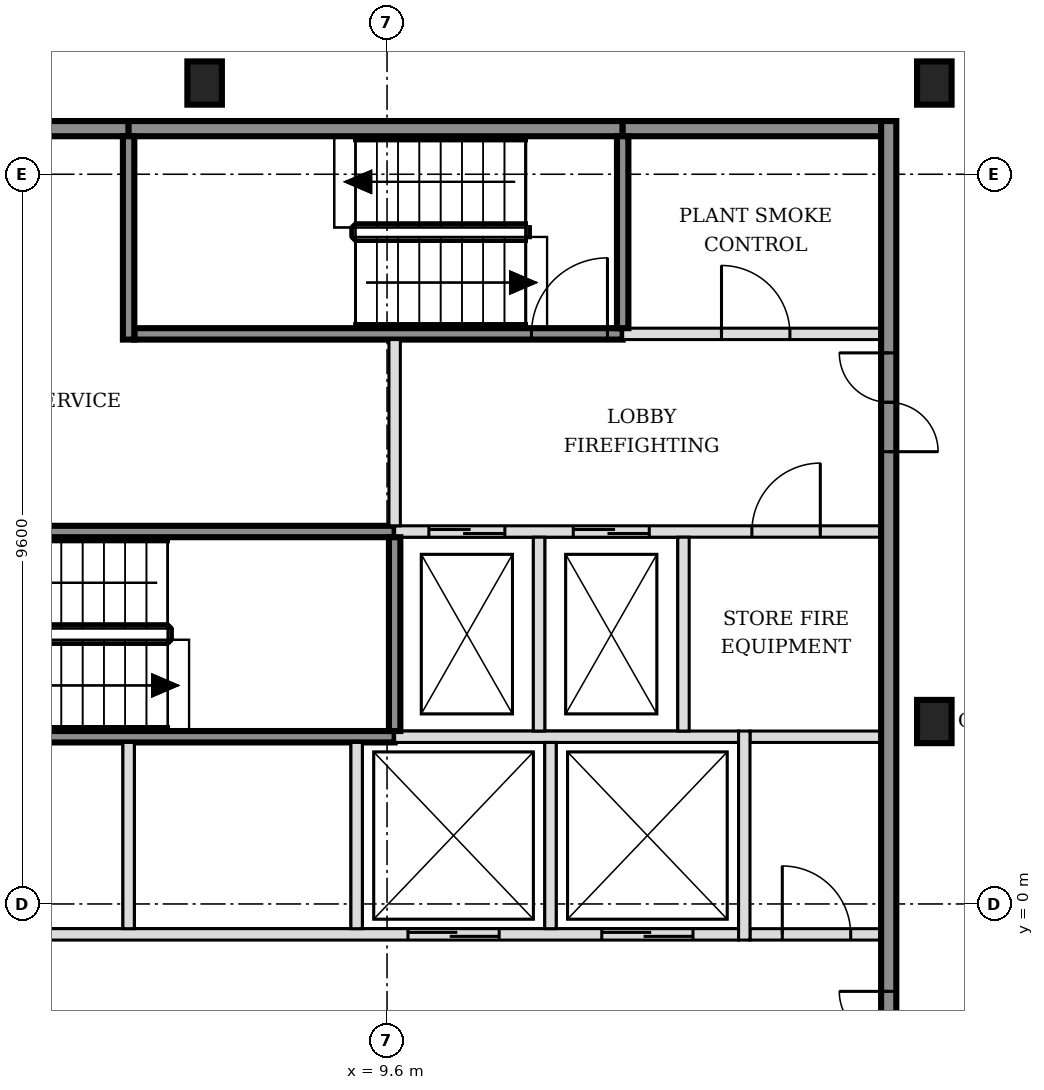
"""IFC4 building model, lengths in metres.
Left out: names, types, materials, properties, quantities, classifications, styles, units other than length and angle.
Written with IfcOpenShell. Run it as: python <this file> out.ifc"""

import sys

from ifc_helpers import new_model, si_unit, direction, frame, frame_2d, origin, origin_2d, place, context, subcontext, project, spatial, rectangle, i_section, extrude, element, fill, save


model = new_model("IFC4")
c1 = context("Model", 3, precision=1e-05, world=origin(), true_north=direction((0.0, 1.0)))
c2 = subcontext(c1, "Body", "Model", "MODEL_VIEW")
j1 = project(units=[si_unit("LENGTHUNIT", "METRE"), si_unit("PLANEANGLEUNIT", "RADIAN")], contexts=[c1])
p1 = place(None, origin())
s1 = spatial("IfcSite", under=j1, at=p1, CompositionType="ELEMENT")
p2 = place(p1, origin())
s2 = spatial("IfcBuilding", under=s1, at=p2, CompositionType="ELEMENT")
p3 = place(p2, frame((0.0, 0.0, 15.0)))
s3 = spatial("IfcBuildingStorey", under=s2, at=p3, CompositionType="ELEMENT", Elevation=15.0)
for number, where, z_axis, x_axis in (
    (1, (16.8, 2.4, -0.2), (0.0, 0.0, 1.0), (1.0, 0.0, 0.0)),
    (2, (7.2, 10.8, -0.2), (0.0, 0.0, 1.0), (1.0, 0.0, 0.0)),
    (3, (16.8, 10.8, -0.2), (0.0, 0.0, 1.0), (1.0, 0.0, 0.0)),
):
    element("IfcColumn", number, at=place(p3, frame(where, z_axis=z_axis, x_axis=x_axis)), inside=s3, PredefinedType="COLUMN", context=c2, shape_type="SweptSolid", body=[
        extrude(i_section(OverallWidth=0.454, OverallDepth=0.569, WebThickness=0.078, FlangeThickness=0.125, FilletRadius=0.015, at=origin_2d()), origin(), (0.0, 0.0, 1.0), 6.0),
    ])
p4 = place(p3, frame((-1.7, -0.4, 0.0), z_axis=(0.0, 0.0, 1.0), x_axis=(1.0, 0.0, 0.0)))
e4 = element("IfcWall", 4, at=p4, inside=s3, PredefinedType="SOLIDWALL", context=c2, shape_type="SweptSolid", body=[
    extrude(rectangle(XDim=15.925, YDim=0.15, at=frame_2d((7.962, 0.0))), origin(), (0.0, 0.0, 1.0), 5.8),
])
p5 = place(p4, frame((0.6, 0.0, 0.0)))
e5 = element("IfcOpeningElement", 5, at=p5, cuts=e4, PredefinedType="OPENING", context=c2, shape_type="SweptSolid", body=[
    extrude(rectangle(XDim=1.1, YDim=2.1, at=frame_2d((0.55, 1.05))), frame((0.0, 0.085, 0.0), z_axis=(0.0, -1.0, 0.0), x_axis=(1.0, 0.0, 0.0)), (0.0, 0.0, 1.0), 0.17),
])
p6 = place(p4, frame((3.1, 0.0, 0.0)))
e6 = element("IfcOpeningElement", 6, at=p6, cuts=e4, PredefinedType="OPENING", context=c2, shape_type="SweptSolid", body=[
    extrude(rectangle(XDim=1.1, YDim=2.1, at=frame_2d((0.55, 1.05))), frame((0.0, 0.085, 0.0), z_axis=(0.0, -1.0, 0.0), x_axis=(1.0, 0.0, 0.0)), (0.0, 0.0, 1.0), 0.17),
])
p7 = place(p4, frame((11.575, 0.0, 0.0)))
e7 = element("IfcOpeningElement", 7, at=p7, cuts=e4, PredefinedType="OPENING", context=c2, shape_type="SweptSolid", body=[
    extrude(rectangle(XDim=1.2, YDim=2.1, at=frame_2d((0.6, 1.05))), frame((0.0, 0.085, 0.0), z_axis=(0.0, -1.0, 0.0), x_axis=(1.0, 0.0, 0.0)), (0.0, 0.0, 1.0), 0.17),
])
p8 = place(p4, frame((14.125, 0.0, 0.0)))
e8 = element("IfcOpeningElement", 8, at=p8, cuts=e4, PredefinedType="OPENING", context=c2, shape_type="SweptSolid", body=[
    extrude(rectangle(XDim=1.2, YDim=2.1, at=frame_2d((0.6, 1.05))), frame((0.0, 0.085, 0.0), z_axis=(0.0, -1.0, 0.0), x_axis=(1.0, 0.0, 0.0)), (0.0, 0.0, 1.0), 0.17),
])
p9 = place(p3, frame((14.375, -0.4, 0.0), z_axis=(0.0, 0.0, 1.0), x_axis=(1.0, 0.0, 0.0)))
e9 = element("IfcWall", 9, at=p9, inside=s3, PredefinedType="PARTITIONING", context=c2, shape_type="SweptSolid", body=[
    extrude(rectangle(XDim=1.725, YDim=0.15, at=frame_2d((0.863, 0.0))), origin(), (0.0, 0.0, 1.0), 5.8),
])
p10 = place(p9, frame((0.425, 0.0, 0.0)))
e10 = element("IfcOpeningElement", 10, at=p10, cuts=e9, PredefinedType="OPENING", context=c2, shape_type="SweptSolid", body=[
    extrude(rectangle(XDim=0.9, YDim=2.1, at=frame_2d((0.45, 1.05))), frame((0.0, 0.085, 0.0), z_axis=(0.0, -1.0, 0.0), x_axis=(1.0, 0.0, 0.0)), (0.0, 0.0, 1.0), 0.17),
])
p11 = place(p3, frame((3.2, 2.2, 0.0), z_axis=(0.0, 0.0, 1.0), x_axis=(1.0, 0.0, 0.0)))
e11 = element("IfcWall", 11, at=p11, inside=s3, PredefinedType="SOLIDWALL", context=c2, shape_type="SweptSolid", body=[
    extrude(rectangle(XDim=6.5, YDim=0.15, at=frame_2d((3.25, 0.0))), origin(), (0.0, 0.0, 1.0), 5.8),
])
p12 = place(p3, frame((9.7, 2.2, 0.0), z_axis=(0.0, 0.0, 1.0), x_axis=(1.0, 0.0, 0.0)))
e12 = element("IfcWall", 12, at=p12, inside=s3, PredefinedType="SOLIDWALL", context=c2, shape_type="SweptSolid", body=[
    extrude(rectangle(XDim=4.525, YDim=0.15, at=frame_2d((2.263, 0.0))), origin(), (0.0, 0.0, 1.0), 5.8),
])
p13 = place(p3, frame((14.375, 2.2, 0.0), z_axis=(0.0, 0.0, 1.0), x_axis=(1.0, 0.0, 0.0)))
e13 = element("IfcWall", 13, at=p13, inside=s3, PredefinedType="PARTITIONING", context=c2, shape_type="SweptSolid", body=[
    extrude(rectangle(XDim=1.725, YDim=0.15, at=frame_2d((0.863, 0.0))), origin(), (0.0, 0.0, 1.0), 5.8),
])
p14 = place(p3, frame((3.275, 4.9, 0.0), z_axis=(0.0, 0.0, 1.0), x_axis=(1.0, 0.0, 0.0)))
e14 = element("IfcWall", 14, at=p14, inside=s3, PredefinedType="SOLIDWALL", context=c2, shape_type="SweptSolid", body=[
    extrude(rectangle(XDim=6.425, YDim=0.15, at=frame_2d((3.212, 0.0))), origin(), (0.0, 0.0, 1.0), 5.8),
])
p15 = place(p14, frame((0.1, 0.0, 0.0)))
e15 = element("IfcOpeningElement", 15, at=p15, cuts=e14, PredefinedType="OPENING", context=c2, shape_type="SweptSolid", body=[
    extrude(rectangle(XDim=1.0, YDim=2.1, at=frame_2d((0.5, 1.05))), frame((0.0, 0.085, 0.0), z_axis=(0.0, -1.0, 0.0), x_axis=(1.0, 0.0, 0.0)), (0.0, 0.0, 1.0), 0.17),
])
p16 = place(p3, frame((9.7, 4.9, 0.0), z_axis=(0.0, 0.0, 1.0), x_axis=(1.0, 0.0, 0.0)))
e16 = element("IfcWall", 16, at=p16, inside=s3, PredefinedType="SOLIDWALL", context=c2, shape_type="SweptSolid", body=[
    extrude(rectangle(XDim=6.4, YDim=0.15, at=frame_2d((3.2, 0.0))), origin(), (0.0, 0.0, 1.0), 5.8),
])
p17 = place(p16, frame((0.45, 0.0, 0.0)))
e17 = element("IfcOpeningElement", 17, at=p17, cuts=e16, PredefinedType="OPENING", context=c2, shape_type="SweptSolid", body=[
    extrude(rectangle(XDim=1.0, YDim=2.1, at=frame_2d((0.5, 1.05))), frame((0.0, 0.085, 0.0), z_axis=(0.0, -1.0, 0.0), x_axis=(1.0, 0.0, 0.0)), (0.0, 0.0, 1.0), 0.17),
])
p18 = place(p16, frame((2.35, 0.0, 0.0)))
e18 = element("IfcOpeningElement", 18, at=p18, cuts=e16, PredefinedType="OPENING", context=c2, shape_type="SweptSolid", body=[
    extrude(rectangle(XDim=1.0, YDim=2.1, at=frame_2d((0.5, 1.05))), frame((0.0, 0.085, 0.0), z_axis=(0.0, -1.0, 0.0), x_axis=(1.0, 0.0, 0.0)), (0.0, 0.0, 1.0), 0.17),
])
p19 = place(p16, frame((4.7, 0.0, 0.0)))
e19 = element("IfcOpeningElement", 19, at=p19, cuts=e16, PredefinedType="OPENING", context=c2, shape_type="SweptSolid", body=[
    extrude(rectangle(XDim=0.9, YDim=2.1, at=frame_2d((0.45, 1.05))), frame((0.0, 0.085, 0.0), z_axis=(0.0, -1.0, 0.0), x_axis=(1.0, 0.0, 0.0)), (0.0, 0.0, 1.0), 0.17),
])
p20 = place(p3, frame((6.275, 7.5, 0.0), z_axis=(0.0, 0.0, 1.0), x_axis=(1.0, 0.0, 0.0)))
e20 = element("IfcWall", 20, at=p20, inside=s3, PredefinedType="SOLIDWALL", context=c2, shape_type="SweptSolid", body=[
    extrude(rectangle(XDim=6.425, YDim=0.15, at=frame_2d((3.212, 0.0))), origin(), (0.0, 0.0, 1.0), 5.8),
])
p21 = place(p20, frame((5.225, 0.0, 0.0)))
e21 = element("IfcOpeningElement", 21, at=p21, cuts=e20, PredefinedType="OPENING", context=c2, shape_type="SweptSolid", body=[
    extrude(rectangle(XDim=1.0, YDim=2.1, at=frame_2d((0.5, 1.05))), frame((0.0, 0.085, 0.0), z_axis=(0.0, -1.0, 0.0), x_axis=(1.0, 0.0, 0.0)), (0.0, 0.0, 1.0), 0.17),
])
p22 = place(p3, frame((12.7, 7.5, 0.0), z_axis=(0.0, 0.0, 1.0), x_axis=(1.0, 0.0, 0.0)))
e22 = element("IfcWall", 22, at=p22, inside=s3, PredefinedType="SOLIDWALL", context=c2, shape_type="SweptSolid", body=[
    extrude(rectangle(XDim=3.4, YDim=0.15, at=frame_2d((1.7, 0.0))), origin(), (0.0, 0.0, 1.0), 5.8),
])
p23 = place(p22, frame((1.3, 0.0, 0.0)))
e23 = element("IfcOpeningElement", 23, at=p23, cuts=e22, PredefinedType="OPENING", context=c2, shape_type="SweptSolid", body=[
    extrude(rectangle(XDim=0.9, YDim=2.1, at=frame_2d((0.45, 1.05))), frame((0.0, 0.085, 0.0), z_axis=(0.0, -1.0, 0.0), x_axis=(1.0, 0.0, 0.0)), (0.0, 0.0, 1.0), 0.17),
])
p24 = place(p3, frame((-1.7, 10.2, 0.0), z_axis=(0.0, 0.0, 1.0), x_axis=(1.0, 0.0, 0.0)))
e24 = element("IfcWall", 24, at=p24, inside=s3, PredefinedType="SOLIDWALL", context=c2, shape_type="SweptSolid", body=[
    extrude(rectangle(XDim=7.9, YDim=0.2, at=frame_2d((3.95, 0.0))), origin(), (0.0, 0.0, 1.0), 5.8),
])
p25 = place(p3, frame((6.2, 10.2, 0.0), z_axis=(0.0, 0.0, 1.0), x_axis=(1.0, 0.0, 0.0)))
e25 = element("IfcWall", 25, at=p25, inside=s3, PredefinedType="SOLIDWALL", context=c2, shape_type="SweptSolid", body=[
    extrude(rectangle(XDim=6.5, YDim=0.2, at=frame_2d((3.25, 0.0))), origin(), (0.0, 0.0, 1.0), 5.8),
])
p26 = place(p3, frame((12.7, 10.2, 0.0), z_axis=(0.0, 0.0, 1.0), x_axis=(1.0, 0.0, 0.0)))
e26 = element("IfcWall", 26, at=p26, inside=s3, PredefinedType="SOLIDWALL", context=c2, shape_type="SweptSolid", body=[
    extrude(rectangle(XDim=3.4, YDim=0.2, at=frame_2d((1.7, 0.0))), origin(), (0.0, 0.0, 1.0), 5.8),
])
p27 = place(p3, frame((6.2, -0.325, 0.0), z_axis=(0.0, 0.0, 1.0), x_axis=(0.0, 1.0, 0.0)))
e27 = element("IfcWall", 27, at=p27, inside=s3, PredefinedType="SOLIDWALL", context=c2, shape_type="SweptSolid", body=[
    extrude(rectangle(XDim=2.45, YDim=0.15, at=frame_2d((1.225, 0.0))), origin(), (0.0, 0.0, 1.0), 5.8),
])
p28 = place(p3, frame((6.2, 7.425, 0.0), z_axis=(0.0, 0.0, 1.0), x_axis=(0.0, 1.0, 0.0)))
e28 = element("IfcWall", 28, at=p28, inside=s3, PredefinedType="SOLIDWALL", context=c2, shape_type="SweptSolid", body=[
    extrude(rectangle(XDim=2.675, YDim=0.15, at=frame_2d((1.337, 0.0))), origin(), (0.0, 0.0, 1.0), 5.8),
])
p29 = place(p3, frame((9.2, -0.325, 0.0), z_axis=(0.0, 0.0, 1.0), x_axis=(0.0, 1.0, 0.0)))
e29 = element("IfcWall", 29, at=p29, inside=s3, PredefinedType="SOLIDWALL", context=c2, shape_type="SweptSolid", body=[
    extrude(rectangle(XDim=2.45, YDim=0.15, at=frame_2d((1.225, 0.0))), origin(), (0.0, 0.0, 1.0), 5.8),
])
p30 = place(p3, frame((9.7, 2.275, 0.0), z_axis=(0.0, 0.0, 1.0), x_axis=(0.0, 1.0, 0.0)))
e30 = element("IfcWall", 30, at=p30, inside=s3, PredefinedType="SOLIDWALL", context=c2, shape_type="SweptSolid", body=[
    extrude(rectangle(XDim=2.55, YDim=0.15, at=frame_2d((1.275, 0.0))), origin(), (0.0, 0.0, 1.0), 5.8),
])
p31 = place(p3, frame((9.7, 4.975, 0.0), z_axis=(0.0, 0.0, 1.0), x_axis=(0.0, 1.0, 0.0)))
e31 = element("IfcWall", 31, at=p31, inside=s3, PredefinedType="SOLIDWALL", context=c2, shape_type="SweptSolid", body=[
    extrude(rectangle(XDim=2.45, YDim=0.15, at=frame_2d((1.225, 0.0))), origin(), (0.0, 0.0, 1.0), 5.8),
])
p32 = place(p3, frame((11.6, 2.275, 0.0), z_axis=(0.0, 0.0, 1.0), x_axis=(0.0, 1.0, 0.0)))
e32 = element("IfcWall", 32, at=p32, inside=s3, PredefinedType="SOLIDWALL", context=c2, shape_type="SweptSolid", body=[
    extrude(rectangle(XDim=2.55, YDim=0.15, at=frame_2d((1.275, 0.0))), origin(), (0.0, 0.0, 1.0), 5.8),
])
p33 = place(p3, frame((11.75, -0.325, 0.0), z_axis=(0.0, 0.0, 1.0), x_axis=(0.0, 1.0, 0.0)))
e33 = element("IfcWall", 33, at=p33, inside=s3, PredefinedType="SOLIDWALL", context=c2, shape_type="SweptSolid", body=[
    extrude(rectangle(XDim=2.45, YDim=0.15, at=frame_2d((1.225, 0.0))), origin(), (0.0, 0.0, 1.0), 5.8),
])
p34 = place(p3, frame((12.7, 7.575, 0.0), z_axis=(0.0, 0.0, 1.0), x_axis=(0.0, 1.0, 0.0)))
e34 = element("IfcWall", 34, at=p34, inside=s3, PredefinedType="SOLIDWALL", context=c2, shape_type="SweptSolid", body=[
    extrude(rectangle(XDim=2.525, YDim=0.15, at=frame_2d((1.263, 0.0))), origin(), (0.0, 0.0, 1.0), 5.8),
])
p35 = place(p3, frame((13.5, 2.275, 0.0), z_axis=(0.0, 0.0, 1.0), x_axis=(0.0, 1.0, 0.0)))
e35 = element("IfcWall", 35, at=p35, inside=s3, PredefinedType="SOLIDWALL", context=c2, shape_type="SweptSolid", body=[
    extrude(rectangle(XDim=2.55, YDim=0.15, at=frame_2d((1.275, 0.0))), origin(), (0.0, 0.0, 1.0), 5.8),
])
p36 = place(p3, frame((14.3, -0.475, 0.0), z_axis=(0.0, 0.0, 1.0), x_axis=(0.0, 1.0, 0.0)))
e36 = element("IfcWall", 36, at=p36, inside=s3, PredefinedType="SOLIDWALL", context=c2, shape_type="SweptSolid", body=[
    extrude(rectangle(XDim=2.75, YDim=0.15, at=frame_2d((1.375, 0.0))), origin(), (0.0, 0.0, 1.0), 5.8),
])
p37 = place(p3, frame((16.2, -5.5, 0.0), z_axis=(0.0, 0.0, 1.0), x_axis=(0.0, 1.0, 0.0)))
e37 = element("IfcWall", 37, at=p37, inside=s3, PredefinedType="SOLIDWALL", context=c2, shape_type="SweptSolid", body=[
    extrude(rectangle(XDim=15.8, YDim=0.2, at=frame_2d((7.9, 0.0))), origin(), (0.0, 0.0, 1.0), 5.8),
])
p38 = place(p37, frame((3.05, 0.0, 0.0)))
e38 = element("IfcOpeningElement", 38, at=p38, cuts=e37, PredefinedType="OPENING", context=c2, shape_type="SweptSolid", body=[
    extrude(rectangle(XDim=1.3, YDim=2.1, at=frame_2d((0.65, 1.05))), frame((0.0, 0.11, 0.0), z_axis=(0.0, -1.0, 0.0), x_axis=(1.0, 0.0, 0.0)), (0.0, 0.0, 1.0), 0.22),
])
p39 = place(p37, frame((11.45, 0.0, 0.0)))
e39 = element("IfcOpeningElement", 39, at=p39, cuts=e37, PredefinedType="OPENING", context=c2, shape_type="SweptSolid", body=[
    extrude(rectangle(XDim=1.3, YDim=2.1, at=frame_2d((0.65, 1.05))), frame((0.0, 0.11, 0.0), z_axis=(0.0, -1.0, 0.0), x_axis=(1.0, 0.0, 0.0)), (0.0, 0.0, 1.0), 0.22),
])
p40 = place(p7, origin())
e40 = element("IfcDoor", 40, at=p40, inside=s3, OperationType="DOUBLE_DOOR_SLIDING", PredefinedType="DOOR", context=c2, shape_type="SweptSolid", body=[
    extrude(rectangle(XDim=1.2, YDim=2.1, at=frame_2d((0.6, 1.05))), frame((0.0, 0.025, 0.0), z_axis=(0.0, -1.0, 0.0), x_axis=(1.0, 0.0, 0.0)), (0.0, 0.0, 1.0), 0.05),
])
fill(e7, e40)
p41 = place(p8, origin())
e41 = element("IfcDoor", 41, at=p41, inside=s3, OperationType="DOUBLE_DOOR_SLIDING", PredefinedType="DOOR", context=c2, shape_type="SweptSolid", body=[
    extrude(rectangle(XDim=1.2, YDim=2.1, at=frame_2d((0.6, 1.05))), frame((0.0, 0.025, 0.0), z_axis=(0.0, -1.0, 0.0), x_axis=(1.0, 0.0, 0.0)), (0.0, 0.0, 1.0), 0.05),
])
fill(e8, e41)
p42 = place(p17, origin())
e42 = element("IfcDoor", 42, at=p42, inside=s3, OperationType="DOUBLE_DOOR_SLIDING", PredefinedType="DOOR", context=c2, shape_type="SweptSolid", body=[
    extrude(rectangle(XDim=1.0, YDim=2.1, at=frame_2d((0.5, 1.05))), frame((0.0, 0.025, 0.0), z_axis=(0.0, -1.0, 0.0), x_axis=(1.0, 0.0, 0.0)), (0.0, 0.0, 1.0), 0.05),
])
fill(e17, e42)
p43 = place(p18, origin())
e43 = element("IfcDoor", 43, at=p43, inside=s3, OperationType="DOUBLE_DOOR_SLIDING", PredefinedType="DOOR", context=c2, shape_type="SweptSolid", body=[
    extrude(rectangle(XDim=1.0, YDim=2.1, at=frame_2d((0.5, 1.05))), frame((0.0, 0.025, 0.0), z_axis=(0.0, -1.0, 0.0), x_axis=(1.0, 0.0, 0.0)), (0.0, 0.0, 1.0), 0.05),
])
fill(e18, e43)
p44 = place(p21, origin())
e44 = element("IfcDoor", 44, at=p44, inside=s3, OperationType="SINGLE_SWING_RIGHT", PredefinedType="DOOR", context=c2, shape_type="SweptSolid", body=[
    extrude(rectangle(XDim=1.0, YDim=2.1, at=frame_2d((0.5, 1.05))), frame((0.0, 0.025, 0.0), z_axis=(0.0, -1.0, 0.0), x_axis=(1.0, 0.0, 0.0)), (0.0, 0.0, 1.0), 0.05),
])
fill(e21, e44)
p45 = place(p38, origin())
e45 = element("IfcDoor", 45, at=p45, inside=s3, OperationType="DOUBLE_DOOR_SINGLE_SWING", PredefinedType="DOOR", context=c2, shape_type="SweptSolid", body=[
    extrude(rectangle(XDim=1.3, YDim=2.1, at=frame_2d((0.65, 1.05))), frame((0.0, 0.025, 0.0), z_axis=(0.0, -1.0, 0.0), x_axis=(1.0, 0.0, 0.0)), (0.0, 0.0, 1.0), 0.05),
])
fill(e38, e45)
p46 = place(p39, origin())
e46 = element("IfcDoor", 46, at=p46, inside=s3, OperationType="DOUBLE_DOOR_SINGLE_SWING", PredefinedType="DOOR", context=c2, shape_type="SweptSolid", body=[
    extrude(rectangle(XDim=1.3, YDim=2.1, at=frame_2d((0.65, 1.05))), frame((0.0, 0.025, 0.0), z_axis=(0.0, -1.0, 0.0), x_axis=(1.0, 0.0, 0.0)), (0.0, 0.0, 1.0), 0.05),
])
fill(e39, e46)
p47 = place(p10, origin())
e47 = element("IfcDoor", 47, at=p47, inside=s3, OperationType="SINGLE_SWING_LEFT", PredefinedType="DOOR", context=c2, shape_type="SweptSolid", body=[
    extrude(rectangle(XDim=0.9, YDim=2.1, at=frame_2d((0.45, 1.05))), frame((0.0, 0.025, 0.0), z_axis=(0.0, -1.0, 0.0), x_axis=(1.0, 0.0, 0.0)), (0.0, 0.0, 1.0), 0.05),
])
fill(e10, e47)
p48 = place(p19, origin())
e48 = element("IfcDoor", 48, at=p48, inside=s3, OperationType="SINGLE_SWING_RIGHT", PredefinedType="DOOR", context=c2, shape_type="SweptSolid", body=[
    extrude(rectangle(XDim=0.9, YDim=2.1, at=frame_2d((0.45, 1.05))), frame((0.0, 0.025, 0.0), z_axis=(0.0, -1.0, 0.0), x_axis=(1.0, 0.0, 0.0)), (0.0, 0.0, 1.0), 0.05),
])
fill(e19, e48)
p49 = place(p23, origin())
e49 = element("IfcDoor", 49, at=p49, inside=s3, OperationType="SINGLE_SWING_LEFT", PredefinedType="DOOR", context=c2, shape_type="SweptSolid", body=[
    extrude(rectangle(XDim=0.9, YDim=2.1, at=frame_2d((0.45, 1.05))), frame((0.0, 0.025, 0.0), z_axis=(0.0, -1.0, 0.0), x_axis=(1.0, 0.0, 0.0)), (0.0, 0.0, 1.0), 0.05),
])
fill(e23, e49)
save(model, sys.argv[1])
